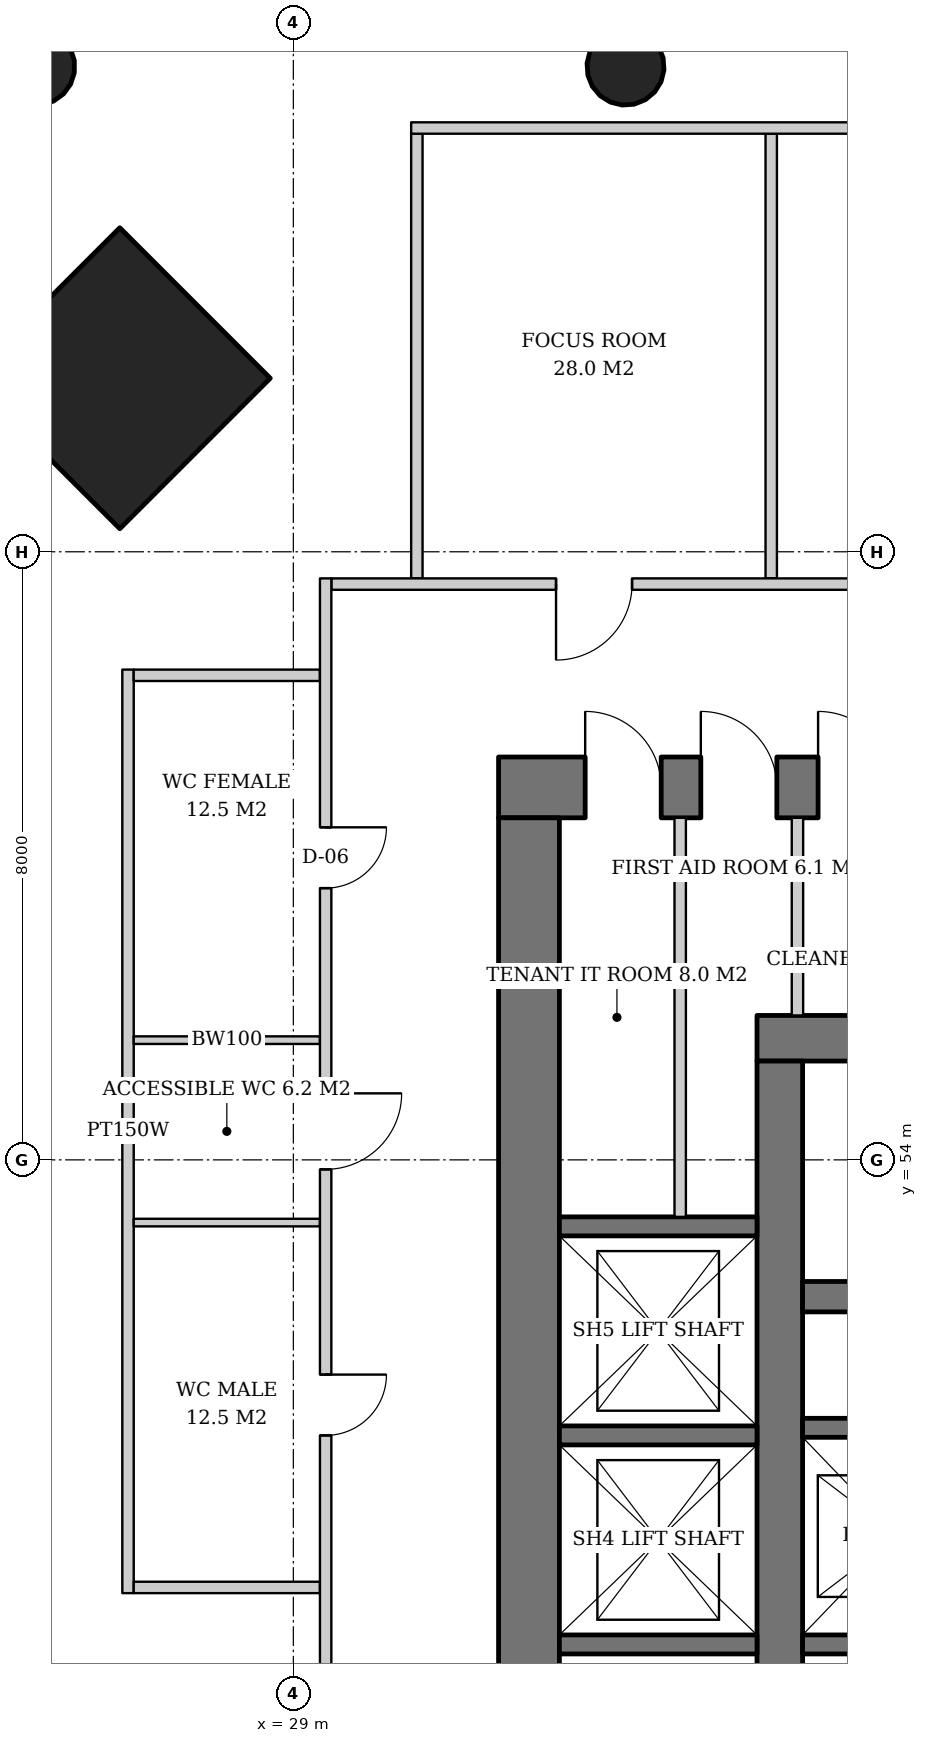
"""IFC4 building model, lengths in metres.
Left out: names, types, materials, properties, quantities, classifications, styles, units other than length and angle.
Written with IfcOpenShell. Run it as: python <this file> out.ifc"""

import sys

from ifc_helpers import new_model, si_unit, direction, frame, frame_2d, origin, origin_2d, place, context, subcontext, project, spatial, rectangle, hollow_circle, extrude, element, fill, save


model = new_model("IFC4")
c1 = context("Model", 3, precision=1e-05, world=origin(), true_north=direction((0.0, 1.0)))
c2 = subcontext(c1, "Body", "Model", "MODEL_VIEW")
j1 = project(units=[si_unit("LENGTHUNIT", "METRE"), si_unit("PLANEANGLEUNIT", "RADIAN")], contexts=[c1])
p1 = place(None, origin())
s1 = spatial("IfcSite", under=j1, at=p1, CompositionType="ELEMENT")
p2 = place(p1, origin())
s2 = spatial("IfcBuilding", under=s1, at=p2, CompositionType="ELEMENT")
p3 = place(p2, frame((0.0, 0.0, 70.4)))
s3 = spatial("IfcBuildingStorey", under=s2, at=p3, CompositionType="ELEMENT", Elevation=70.4)
p4 = place(p3, frame((26.678, 64.322, 0.0), z_axis=(0.031962158256, -0.031962158256, 0.998977898093), x_axis=(0.707106781187, 0.707106781187, 0.0)))
e1 = element("IfcColumn", 1, at=p4, inside=s3, PredefinedType="COLUMN", context=c2, shape_type="SweptSolid", body=[
    extrude(rectangle(XDim=2.8, YDim=2.8, at=origin_2d()), origin(), (0.0, 0.0, 1.0), 3.804),
])
p5 = place(p3, frame((25.579, 68.421, 0.0), z_axis=(0.031898107953, -0.031898107953, 0.998981992539), x_axis=(0.707106781187, 0.707106781187, 0.0)))
e2 = element("IfcColumn", 2, at=p5, inside=s3, PredefinedType="COLUMN", context=c2, shape_type="SweptSolid", body=[
    extrude(hollow_circle(Radius=0.508, WallThickness=0.04, at=origin_2d()), origin(), (0.0, 0.0, 1.0), 3.804),
])
p6 = place(p3, frame((33.347, 68.421, 0.0), z_axis=(0.019132263625, -0.031908506785, 0.999307662176), x_axis=(0.857645150882, 0.514241961696, 0.0)))
e3 = element("IfcColumn", 3, at=p6, inside=s3, PredefinedType="COLUMN", context=c2, shape_type="SweptSolid", body=[
    extrude(hollow_circle(Radius=0.508, WallThickness=0.04, at=origin_2d()), origin(), (0.0, 0.0, 1.0), 3.803),
])
p7 = place(p3, frame((35.1, 55.6, 0.0), z_axis=(0.0, 0.0, 1.0), x_axis=(1.0, 0.0, 0.0)))
e4 = element("IfcWall", 4, at=p7, inside=s3, PredefinedType="SHEAR", context=c2, shape_type="SweptSolid", body=[
    extrude(rectangle(XDim=19.8, YDim=0.6, at=frame_2d((9.9, 0.0))), origin(), (0.0, 0.0, 1.0), 3.8),
])
p8 = place(p7, frame((14.54, 0.0, 0.0)))
e5 = element("IfcOpeningElement", 5, at=p8, cuts=e4, PredefinedType="OPENING", context=c2, shape_type="SweptSolid", body=[
    extrude(rectangle(XDim=1.0, YDim=2.1, at=frame_2d((0.5, 1.05))), frame((0.0, 0.31, 0.0), z_axis=(0.0, -1.0, 0.0), x_axis=(1.0, 0.0, 0.0)), (0.0, 0.0, 1.0), 0.62),
])
p9 = place(p7, frame((2.425, 0.0, 0.0)))
e6 = element("IfcOpeningElement", 6, at=p9, cuts=e4, PredefinedType="OPENING", context=c2, shape_type="SweptSolid", body=[
    extrude(rectangle(XDim=1.0, YDim=2.1, at=frame_2d((0.5, 1.05))), frame((0.0, 0.31, 0.0), z_axis=(0.0, -1.0, 0.0), x_axis=(1.0, 0.0, 0.0)), (0.0, 0.0, 1.0), 0.62),
])
p10 = place(p3, frame((35.4, 36.7, 0.0), z_axis=(0.0, 0.0, 1.0), x_axis=(0.0, 1.0, 0.0)))
e7 = element("IfcWall", 7, at=p10, inside=s3, PredefinedType="SHEAR", context=c2, shape_type="SweptSolid", body=[
    extrude(rectangle(XDim=18.6, YDim=0.6, at=frame_2d((9.3, 0.0))), origin(), (0.0, 0.0, 1.0), 3.8),
])
p11 = place(p10, frame((8.4, 0.0, 0.0)))
e8 = element("IfcOpeningElement", 8, at=p11, cuts=e7, PredefinedType="OPENING", context=c2, shape_type="SweptSolid", body=[
    extrude(rectangle(XDim=1.8, YDim=2.4, at=frame_2d((0.9, 1.2))), frame((0.0, 0.31, 0.0), z_axis=(0.0, -1.0, 0.0), x_axis=(1.0, 0.0, 0.0)), (0.0, 0.0, 1.0), 0.62),
])
p12 = place(p3, frame((31.7, 58.9, 0.0), z_axis=(0.0, 0.0, 1.0), x_axis=(1.0, 0.0, 0.0)))
e9 = element("IfcWall", 9, at=p12, inside=s3, PredefinedType="SHEAR", context=c2, shape_type="SweptSolid", body=[
    extrude(rectangle(XDim=26.6, YDim=0.8, at=frame_2d((13.3, 0.0))), origin(), (0.0, 0.0, 1.0), 3.8),
])
p13 = place(p12, frame((17.94, 0.0, 0.0)))
e10 = element("IfcOpeningElement", 10, at=p13, cuts=e9, PredefinedType="OPENING", context=c2, shape_type="SweptSolid", body=[
    extrude(rectangle(XDim=1.0, YDim=2.1, at=frame_2d((0.5, 1.05))), frame((0.0, 0.41, 0.0), z_axis=(0.0, -1.0, 0.0), x_axis=(1.0, 0.0, 0.0)), (0.0, 0.0, 1.0), 0.82),
])
p14 = place(p12, frame((5.825, 0.0, 0.0)))
e11 = element("IfcOpeningElement", 11, at=p14, cuts=e9, PredefinedType="OPENING", context=c2, shape_type="SweptSolid", body=[
    extrude(rectangle(XDim=1.0, YDim=2.1, at=frame_2d((0.5, 1.05))), frame((0.0, 0.41, 0.0), z_axis=(0.0, -1.0, 0.0), x_axis=(1.0, 0.0, 0.0)), (0.0, 0.0, 1.0), 0.82),
])
p15 = place(p12, frame((1.139, 0.0, 0.0)))
e12 = element("IfcOpeningElement", 12, at=p15, cuts=e9, PredefinedType="OPENING", context=c2, shape_type="SweptSolid", body=[
    extrude(rectangle(XDim=1.0, YDim=2.1, at=frame_2d((0.5, 1.05))), frame((0.0, 0.41, 0.0), z_axis=(0.0, -1.0, 0.0), x_axis=(1.0, 0.0, 0.0)), (0.0, 0.0, 1.0), 0.82),
])
p16 = place(p12, frame((2.661, 0.0, 0.0)))
e13 = element("IfcOpeningElement", 13, at=p16, cuts=e9, PredefinedType="OPENING", context=c2, shape_type="SweptSolid", body=[
    extrude(rectangle(XDim=1.0, YDim=2.1, at=frame_2d((0.5, 1.05))), frame((0.0, 0.41, 0.0), z_axis=(0.0, -1.0, 0.0), x_axis=(1.0, 0.0, 0.0)), (0.0, 0.0, 1.0), 0.82),
])
p17 = place(p12, frame((4.204, 0.0, 0.0)))
e14 = element("IfcOpeningElement", 14, at=p17, cuts=e9, PredefinedType="OPENING", context=c2, shape_type="SweptSolid", body=[
    extrude(rectangle(XDim=1.0, YDim=2.1, at=frame_2d((0.5, 1.05))), frame((0.0, 0.41, 0.0), z_axis=(0.0, -1.0, 0.0), x_axis=(1.0, 0.0, 0.0)), (0.0, 0.0, 1.0), 0.82),
])
p18 = place(p12, frame((8.44, 0.0, 0.0)))
e15 = element("IfcOpeningElement", 15, at=p18, cuts=e9, PredefinedType="OPENING", context=c2, shape_type="SweptSolid", body=[
    extrude(rectangle(XDim=1.0, YDim=2.1, at=frame_2d((0.5, 1.05))), frame((0.0, 0.41, 0.0), z_axis=(0.0, -1.0, 0.0), x_axis=(1.0, 0.0, 0.0)), (0.0, 0.0, 1.0), 0.82),
])
p19 = place(p12, frame((13.342, 0.0, 0.0)))
e16 = element("IfcOpeningElement", 16, at=p19, cuts=e9, PredefinedType="OPENING", context=c2, shape_type="SweptSolid", body=[
    extrude(rectangle(XDim=1.0, YDim=2.1, at=frame_2d((0.5, 1.05))), frame((0.0, 0.41, 0.0), z_axis=(0.0, -1.0, 0.0), x_axis=(1.0, 0.0, 0.0)), (0.0, 0.0, 1.0), 0.82),
])
p20 = place(p12, frame((22.35, 0.0, 0.0)))
e17 = element("IfcOpeningElement", 17, at=p20, cuts=e9, PredefinedType="OPENING", context=c2, shape_type="SweptSolid", body=[
    extrude(rectangle(XDim=1.0, YDim=2.1, at=frame_2d((0.5, 1.05))), frame((0.0, 0.41, 0.0), z_axis=(0.0, -1.0, 0.0), x_axis=(1.0, 0.0, 0.0)), (0.0, 0.0, 1.0), 0.82),
])
p21 = place(p3, frame((32.1, 33.5, 0.0), z_axis=(0.0, 0.0, 1.0), x_axis=(0.0, 1.0, 0.0)))
e18 = element("IfcWall", 18, at=p21, inside=s3, PredefinedType="SHEAR", context=c2, shape_type="SweptSolid", body=[
    extrude(rectangle(XDim=25.0, YDim=0.8, at=frame_2d((12.5, 0.0))), origin(), (0.0, 0.0, 1.0), 3.8),
])
p22 = place(p21, frame((11.6, 0.0, 0.0)))
e19 = element("IfcOpeningElement", 19, at=p22, cuts=e18, PredefinedType="OPENING", context=c2, shape_type="SweptSolid", body=[
    extrude(rectangle(XDim=1.8, YDim=2.4, at=frame_2d((0.9, 1.2))), frame((0.0, 0.41, 0.0), z_axis=(0.0, -1.0, 0.0), x_axis=(1.0, 0.0, 0.0)), (0.0, 0.0, 1.0), 0.82),
])
p23 = place(p3, frame((35.7, 52.2, 0.0), z_axis=(0.0, 0.0, 1.0), x_axis=(1.0, 0.0, 0.0)))
e20 = element("IfcWall", 20, at=p23, inside=s3, PredefinedType="SHEAR", context=c2, shape_type="SweptSolid", body=[
    extrude(rectangle(XDim=18.6, YDim=0.4, at=frame_2d((9.3, 0.0))), origin(), (0.0, 0.0, 1.0), 3.8),
])
p24 = place(p3, frame((35.7, 50.475, 0.0), z_axis=(0.0, 0.0, 1.0), x_axis=(1.0, 0.0, 0.0)))
e21 = element("IfcWall", 21, at=p24, inside=s3, PredefinedType="SHEAR", context=c2, shape_type="SweptSolid", body=[
    extrude(rectangle(XDim=11.0, YDim=0.25, at=frame_2d((5.5, 0.0))), origin(), (0.0, 0.0, 1.0), 3.8),
])
p25 = place(p3, frame((35.7, 47.625, 0.0), z_axis=(0.0, 0.0, 1.0), x_axis=(1.0, 0.0, 0.0)))
e22 = element("IfcWall", 22, at=p25, inside=s3, PredefinedType="SHEAR", context=c2, shape_type="SweptSolid", body=[
    extrude(rectangle(XDim=12.83, YDim=0.25, at=frame_2d((6.415, 0.0))), origin(), (0.0, 0.0, 1.0), 3.8),
])
p26 = place(p25, frame((0.7, 0.0, 0.0)))
e23 = element("IfcOpeningElement", 23, at=p26, cuts=e22, PredefinedType="OPENING", context=c2, shape_type="SweptSolid", body=[
    extrude(rectangle(XDim=1.1, YDim=2.2, at=frame_2d((0.55, 1.1))), frame((0.0, 0.135, 0.0), z_axis=(0.0, -1.0, 0.0), x_axis=(1.0, 0.0, 0.0)), (0.0, 0.0, 1.0), 0.27),
])
p27 = place(p25, frame((3.45, 0.0, 0.0)))
e24 = element("IfcOpeningElement", 24, at=p27, cuts=e22, PredefinedType="OPENING", context=c2, shape_type="SweptSolid", body=[
    extrude(rectangle(XDim=1.1, YDim=2.2, at=frame_2d((0.55, 1.1))), frame((0.0, 0.135, 0.0), z_axis=(0.0, -1.0, 0.0), x_axis=(1.0, 0.0, 0.0)), (0.0, 0.0, 1.0), 0.27),
])
p28 = place(p25, frame((6.2, 0.0, 0.0)))
e25 = element("IfcOpeningElement", 25, at=p28, cuts=e22, PredefinedType="OPENING", context=c2, shape_type="SweptSolid", body=[
    extrude(rectangle(XDim=1.1, YDim=2.2, at=frame_2d((0.55, 1.1))), frame((0.0, 0.135, 0.0), z_axis=(0.0, -1.0, 0.0), x_axis=(1.0, 0.0, 0.0)), (0.0, 0.0, 1.0), 0.27),
])
p29 = place(p25, frame((8.95, 0.0, 0.0)))
e26 = element("IfcOpeningElement", 26, at=p29, cuts=e22, PredefinedType="OPENING", context=c2, shape_type="SweptSolid", body=[
    extrude(rectangle(XDim=1.1, YDim=2.2, at=frame_2d((0.55, 1.1))), frame((0.0, 0.135, 0.0), z_axis=(0.0, -1.0, 0.0), x_axis=(1.0, 0.0, 0.0)), (0.0, 0.0, 1.0), 0.27),
])
p30 = place(p25, frame((11.515, 0.0, 0.0)))
e27 = element("IfcOpeningElement", 27, at=p30, cuts=e22, PredefinedType="OPENING", context=c2, shape_type="SweptSolid", body=[
    extrude(rectangle(XDim=0.8, YDim=2.0, at=frame_2d((0.4, 1.0))), frame((0.0, 0.135, 0.0), z_axis=(0.0, -1.0, 0.0), x_axis=(1.0, 0.0, 0.0)), (0.0, 0.0, 1.0), 0.27),
])
for number, where, z_axis, x_axis in (
    (28, (32.5, 47.625, 0.0), (0.0, 0.0, 1.0), (1.0, 0.0, 0.0)),
    (29, (32.5, 50.375, 0.0), (0.0, 0.0, 1.0), (1.0, 0.0, 0.0)),
    (30, (32.5, 53.125, 0.0), (0.0, 0.0, 1.0), (1.0, 0.0, 0.0)),
):
    element("IfcWall", number, at=place(p3, frame(where, z_axis=z_axis, x_axis=x_axis)), inside=s3, PredefinedType="SHEAR", context=c2, shape_type="SweptSolid", body=[
        extrude(rectangle(XDim=2.6, YDim=0.25, at=frame_2d((1.3, 0.0))), origin(), (0.0, 0.0, 1.0), 3.8),
    ])
p31 = place(p3, frame((34.09, 53.25, 0.0), z_axis=(0.0, 0.0, 1.0), x_axis=(0.0, 1.0, 0.0)))
e31 = element("IfcWall", 31, at=p31, inside=s3, PredefinedType="SOLIDWALL", context=c2, shape_type="SweptSolid", body=[
    extrude(rectangle(XDim=5.25, YDim=0.15, at=frame_2d((2.625, 0.0))), origin(), (0.0, 0.0, 1.0), 3.62),
])
p32 = place(p3, frame((35.632, 55.9, 0.0), z_axis=(0.0, 0.0, 1.0), x_axis=(0.0, 1.0, 0.0)))
e32 = element("IfcWall", 32, at=p32, inside=s3, PredefinedType="SOLIDWALL", context=c2, shape_type="SweptSolid", body=[
    extrude(rectangle(XDim=2.6, YDim=0.15, at=frame_2d((1.3, 0.0))), origin(), (0.0, 0.0, 1.0), 3.62),
])
p33 = place(p3, frame((35.287, 61.65, 0.0), z_axis=(0.0, 0.0, 1.0), x_axis=(0.0, 1.0, 0.0)))
e33 = element("IfcWall", 33, at=p33, inside=s3, PredefinedType="PARTITIONING", context=c2, shape_type="SweptSolid", body=[
    extrude(rectangle(XDim=5.85, YDim=0.15, at=frame_2d((2.925, 0.0))), origin(), (0.0, 0.0, 1.0), 3.62),
])
p34 = place(p3, frame((30.625, 61.65, 0.0), z_axis=(0.0, 0.0, 1.0), x_axis=(0.0, 1.0, 0.0)))
e34 = element("IfcWall", 34, at=p34, inside=s3, PredefinedType="PARTITIONING", context=c2, shape_type="SweptSolid", body=[
    extrude(rectangle(XDim=5.85, YDim=0.15, at=frame_2d((2.925, 0.0))), origin(), (0.0, 0.0, 1.0), 2.806),
])
p35 = place(p3, frame((59.45, 67.575, 0.0), z_axis=(0.0, 0.0, 1.0), x_axis=(-1.0, 0.0, 0.0)))
e35 = element("IfcWall", 35, at=p35, inside=s3, PredefinedType="PARTITIONING", context=c2, shape_type="SweptSolid", body=[
    extrude(rectangle(XDim=28.9, YDim=0.15, at=frame_2d((14.45, 0.0))), origin(), (0.0, 0.0, 1.0), 2.612),
])
p36 = place(p3, frame((26.825, 60.45, 0.0), z_axis=(0.0, 0.0, 1.0), x_axis=(0.0, -1.0, 0.0)))
e36 = element("IfcWall", 36, at=p36, inside=s3, PredefinedType="PARTITIONING", context=c2, shape_type="SweptSolid", body=[
    extrude(rectangle(XDim=12.15, YDim=0.15, at=frame_2d((6.075, 0.0))), origin(), (0.0, 0.0, 1.0), 2.612),
])
p37 = place(p3, frame((29.35, 60.375, 0.0), z_axis=(0.0, 0.0, 1.0), x_axis=(-1.0, 0.0, 0.0)))
e37 = element("IfcWall", 37, at=p37, inside=s3, PredefinedType="PARTITIONING", context=c2, shape_type="SweptSolid", body=[
    extrude(rectangle(XDim=2.45, YDim=0.15, at=frame_2d((1.225, 0.0))), origin(), (0.0, 0.0, 1.0), 3.62),
])
for number, where, z_axis, x_axis in (
    (38, (29.35, 55.575, 0.0), (0.0, 0.0, 1.0), (-1.0, 0.0, 0.0)),
    (39, (29.35, 53.175, 0.0), (0.0, 0.0, 1.0), (-1.0, 0.0, 0.0)),
):
    element("IfcWall", number, at=place(p3, frame(where, z_axis=z_axis, x_axis=x_axis)), inside=s3, PredefinedType="SOLIDWALL", context=c2, shape_type="SweptSolid", body=[
        extrude(rectangle(XDim=2.45, YDim=0.1, at=frame_2d((1.225, 0.0))), origin(), (0.0, 0.0, 1.0), 3.62),
    ])
p38 = place(p3, frame((29.35, 48.375, 0.0), z_axis=(0.0, 0.0, 1.0), x_axis=(-1.0, 0.0, 0.0)))
e40 = element("IfcWall", 40, at=p38, inside=s3, PredefinedType="PARTITIONING", context=c2, shape_type="SweptSolid", body=[
    extrude(rectangle(XDim=2.45, YDim=0.15, at=frame_2d((1.225, 0.0))), origin(), (0.0, 0.0, 1.0), 3.62),
])
p39 = place(p3, frame((60.65, 61.575, 0.0), z_axis=(0.0, 0.0, 1.0), x_axis=(-1.0, 0.0, 0.0)))
e41 = element("IfcWall", 41, at=p39, inside=s3, PredefinedType="PARTITIONING", context=c2, shape_type="SweptSolid", body=[
    extrude(rectangle(XDim=31.15, YDim=0.15, at=frame_2d((15.575, 0.0))), origin(), (0.0, 0.0, 1.0), 2.612),
])
p40 = place(p39, frame((3.883, 0.0, 0.0)))
e42 = element("IfcOpeningElement", 42, at=p40, cuts=e41, PredefinedType="OPENING", context=c2, shape_type="SweptSolid", body=[
    extrude(rectangle(XDim=1.0, YDim=2.1, at=frame_2d((0.5, 1.05))), frame((0.0, 0.085, 0.0), z_axis=(0.0, -1.0, 0.0), x_axis=(1.0, 0.0, 0.0)), (0.0, 0.0, 1.0), 0.17),
])
p41 = place(p39, frame((10.099, 0.0, 0.0)))
e43 = element("IfcOpeningElement", 43, at=p41, cuts=e41, PredefinedType="OPENING", context=c2, shape_type="SweptSolid", body=[
    extrude(rectangle(XDim=1.0, YDim=2.1, at=frame_2d((0.5, 1.05))), frame((0.0, 0.085, 0.0), z_axis=(0.0, -1.0, 0.0), x_axis=(1.0, 0.0, 0.0)), (0.0, 0.0, 1.0), 0.17),
])
p42 = place(p39, frame((19.035, 0.0, 0.0)))
e44 = element("IfcOpeningElement", 44, at=p42, cuts=e41, PredefinedType="OPENING", context=c2, shape_type="SweptSolid", body=[
    extrude(rectangle(XDim=1.0, YDim=2.1, at=frame_2d((0.5, 1.05))), frame((0.0, 0.085, 0.0), z_axis=(0.0, -1.0, 0.0), x_axis=(1.0, 0.0, 0.0)), (0.0, 0.0, 1.0), 0.17),
])
p43 = place(p39, frame((27.194, 0.0, 0.0)))
e45 = element("IfcOpeningElement", 45, at=p43, cuts=e41, PredefinedType="OPENING", context=c2, shape_type="SweptSolid", body=[
    extrude(rectangle(XDim=1.0, YDim=2.1, at=frame_2d((0.5, 1.05))), frame((0.0, 0.085, 0.0), z_axis=(0.0, -1.0, 0.0), x_axis=(1.0, 0.0, 0.0)), (0.0, 0.0, 1.0), 0.17),
])
p44 = place(p3, frame((29.425, 61.65, 0.0), z_axis=(0.0, 0.0, 1.0), x_axis=(0.0, -1.0, 0.0)))
e46 = element("IfcWall", 46, at=p44, inside=s3, PredefinedType="PARTITIONING", context=c2, shape_type="SweptSolid", body=[
    extrude(rectangle(XDim=31.15, YDim=0.15, at=frame_2d((15.575, 0.0))), origin(), (0.0, 0.0, 1.0), 2.612),
])
p45 = place(p44, frame((3.275, 0.0, 0.0)))
e47 = element("IfcOpeningElement", 47, at=p45, cuts=e46, PredefinedType="OPENING", context=c2, shape_type="SweptSolid", body=[
    extrude(rectangle(XDim=0.8, YDim=2.1, at=frame_2d((0.4, 1.05))), frame((0.0, 0.085, 0.0), z_axis=(0.0, -1.0, 0.0), x_axis=(1.0, 0.0, 0.0)), (0.0, 0.0, 1.0), 0.17),
])
p46 = place(p44, frame((6.775, 0.0, 0.0)))
e48 = element("IfcOpeningElement", 48, at=p46, cuts=e46, PredefinedType="OPENING", context=c2, shape_type="SweptSolid", body=[
    extrude(rectangle(XDim=1.0, YDim=2.1, at=frame_2d((0.5, 1.05))), frame((0.0, 0.085, 0.0), z_axis=(0.0, -1.0, 0.0), x_axis=(1.0, 0.0, 0.0)), (0.0, 0.0, 1.0), 0.17),
])
p47 = place(p44, frame((10.475, 0.0, 0.0)))
e49 = element("IfcOpeningElement", 49, at=p47, cuts=e46, PredefinedType="OPENING", context=c2, shape_type="SweptSolid", body=[
    extrude(rectangle(XDim=0.8, YDim=2.1, at=frame_2d((0.4, 1.05))), frame((0.0, 0.085, 0.0), z_axis=(0.0, -1.0, 0.0), x_axis=(1.0, 0.0, 0.0)), (0.0, 0.0, 1.0), 0.17),
])
p48 = place(p15, origin())
e50 = element("IfcDoor", 50, at=p48, inside=s3, OperationType="SINGLE_SWING_LEFT", PredefinedType="DOOR", context=c2, shape_type="SweptSolid", body=[
    extrude(rectangle(XDim=1.0, YDim=2.1, at=frame_2d((0.5, 1.05))), frame((0.0, -0.34, 0.0), z_axis=(0.0, -1.0, 0.0), x_axis=(1.0, 0.0, 0.0)), (0.0, 0.0, 1.0), 0.05),
])
fill(e12, e50)
p49 = place(p16, origin())
e51 = element("IfcDoor", 51, at=p49, inside=s3, OperationType="SINGLE_SWING_LEFT", PredefinedType="DOOR", context=c2, shape_type="SweptSolid", body=[
    extrude(rectangle(XDim=1.0, YDim=2.1, at=frame_2d((0.5, 1.05))), frame((0.0, -0.34, 0.0), z_axis=(0.0, -1.0, 0.0), x_axis=(1.0, 0.0, 0.0)), (0.0, 0.0, 1.0), 0.05),
])
fill(e13, e51)
p50 = place(p17, origin())
e52 = element("IfcDoor", 52, at=p50, inside=s3, OperationType="SINGLE_SWING_LEFT", PredefinedType="DOOR", context=c2, shape_type="SweptSolid", body=[
    extrude(rectangle(XDim=1.0, YDim=2.1, at=frame_2d((0.5, 1.05))), frame((0.0, -0.34, 0.0), z_axis=(0.0, -1.0, 0.0), x_axis=(1.0, 0.0, 0.0)), (0.0, 0.0, 1.0), 0.05),
])
fill(e14, e52)
p51 = place(p43, origin())
e53 = element("IfcDoor", 53, at=p51, inside=s3, OperationType="SINGLE_SWING_RIGHT", PredefinedType="DOOR", context=c2, shape_type="SweptSolid", body=[
    extrude(rectangle(XDim=1.0, YDim=2.1, at=frame_2d((0.5, 1.05))), frame((0.0, 0.025, 0.0), z_axis=(0.0, -1.0, 0.0), x_axis=(1.0, 0.0, 0.0)), (0.0, 0.0, 1.0), 0.05),
])
fill(e45, e53)
p52 = place(p45, origin())
e54 = element("IfcDoor", 54, at=p52, inside=s3, OperationType="SINGLE_SWING_LEFT", PredefinedType="DOOR", context=c2, shape_type="SweptSolid", body=[
    extrude(rectangle(XDim=0.8, YDim=2.1, at=frame_2d((0.4, 1.05))), frame((0.0, 0.025, 0.0), z_axis=(0.0, -1.0, 0.0), x_axis=(1.0, 0.0, 0.0)), (0.0, 0.0, 1.0), 0.05),
])
fill(e47, e54)
p53 = place(p46, origin())
e55 = element("IfcDoor", 55, at=p53, inside=s3, OperationType="SINGLE_SWING_LEFT", PredefinedType="DOOR", context=c2, shape_type="SweptSolid", body=[
    extrude(rectangle(XDim=1.0, YDim=2.1, at=frame_2d((0.5, 1.05))), frame((0.0, 0.025, 0.0), z_axis=(0.0, -1.0, 0.0), x_axis=(1.0, 0.0, 0.0)), (0.0, 0.0, 1.0), 0.05),
])
fill(e48, e55)
p54 = place(p47, origin())
e56 = element("IfcDoor", 56, at=p54, inside=s3, OperationType="SINGLE_SWING_LEFT", PredefinedType="DOOR", context=c2, shape_type="SweptSolid", body=[
    extrude(rectangle(XDim=0.8, YDim=2.1, at=frame_2d((0.4, 1.05))), frame((0.0, 0.025, 0.0), z_axis=(0.0, -1.0, 0.0), x_axis=(1.0, 0.0, 0.0)), (0.0, 0.0, 1.0), 0.05),
])
fill(e49, e56)
save(model, sys.argv[1])
